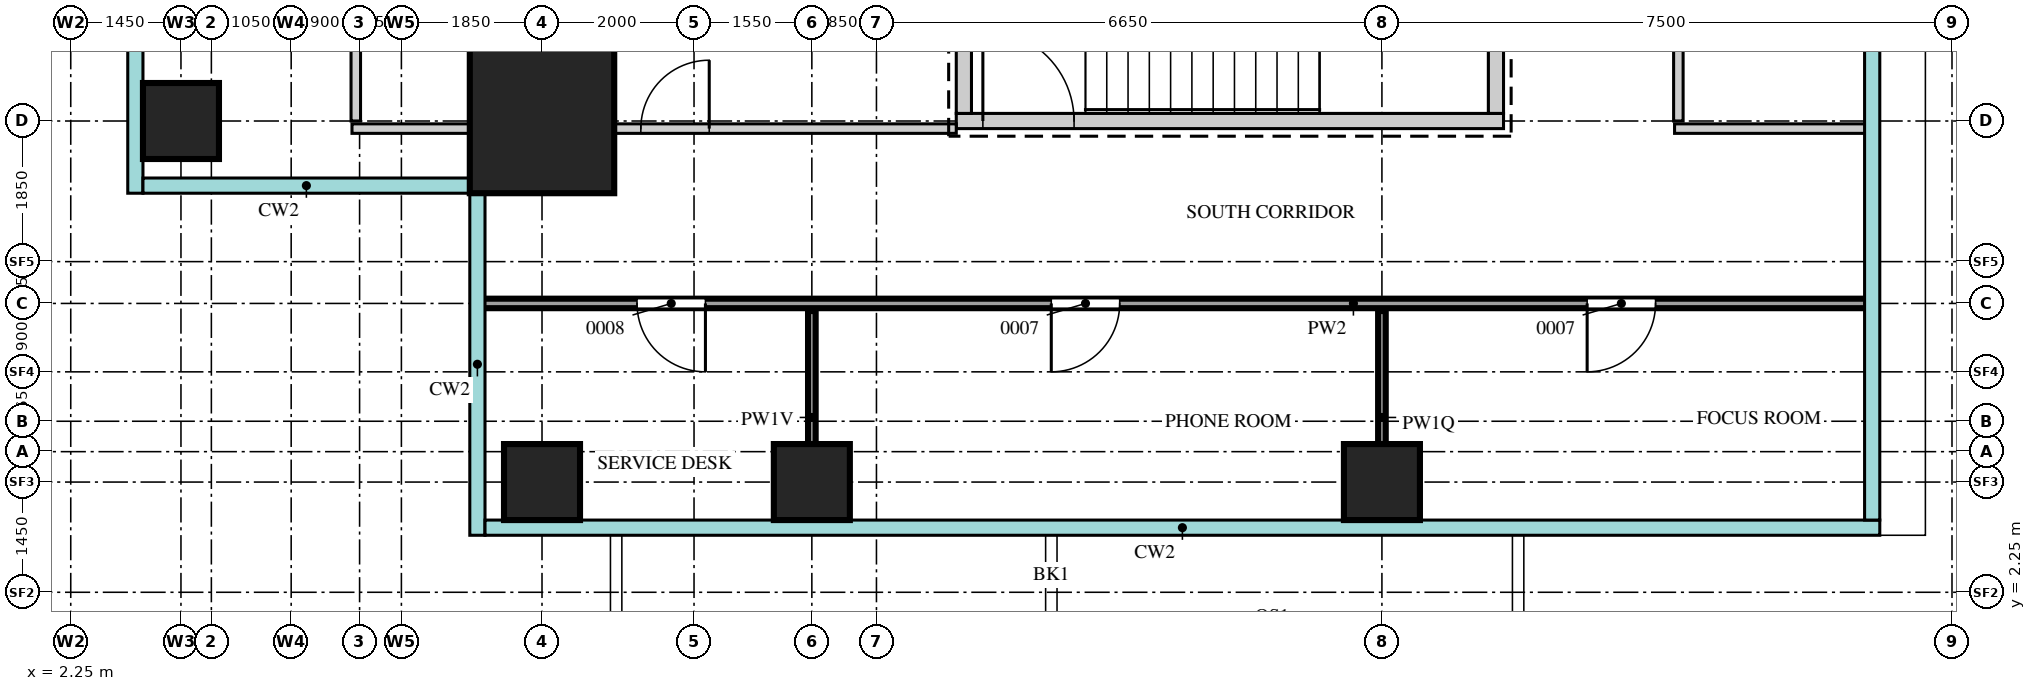
"""IFC4 building model, lengths in metres.
Left out: names, types, materials, properties, quantities, classifications, styles, units other than length and angle.
Written with IfcOpenShell. Run it as: python <this file> out.ifc"""

import sys

from ifc_helpers import new_model, si_unit, direction, frame, frame_2d, origin, origin_2d, place, context, subcontext, project, spatial, rectangle, extrude, source, transform, mapped, element, fill, save


model = new_model("IFC4")
c1 = context("Model", 3, precision=1e-05, world=origin(), true_north=direction((0.0, 1.0)))
c2 = subcontext(c1, "Body", "Model", "MODEL_VIEW")
j1 = project(units=[si_unit("LENGTHUNIT", "METRE"), si_unit("PLANEANGLEUNIT", "RADIAN")], contexts=[c1])
p1 = place(None, origin())
s1 = spatial("IfcSite", under=j1, at=p1, CompositionType="ELEMENT")
p2 = place(p1, origin())
s2 = spatial("IfcBuilding", under=s1, at=p2, CompositionType="ELEMENT")
p3 = place(p2, frame((0.0, 0.0, 168.7)))
s3 = spatial("IfcBuildingStorey", under=s2, at=p3, CompositionType="ELEMENT", Elevation=168.7)
m1 = source(origin(), c2, "Body", "SweptSolid", [
    extrude(rectangle(XDim=7.2, YDim=0.2, at=frame_2d((3.6, 0.0))), origin(), (0.0, 0.0, 1.0), 3.75),
])
p4 = place(p3, frame((13.9, 8.45, 0.0), z_axis=(0.0, 0.0, 1.0), x_axis=(1.0, 0.0, 0.0)))
e1 = element("IfcWall", 1, at=p4, inside=s3, PredefinedType="SHEAR", context=c2, shape_type="MappedRepresentation", body=[
    mapped(m1, transform((0.0, 0.0, 0.0))),
])
m2 = source(origin(), c2, "Body", "SweptSolid", [
    extrude(rectangle(XDim=1.2, YDim=2.1, at=frame_2d((0.6, 1.05))), frame((0.0, 0.11, 0.0), z_axis=(0.0, -1.0, 0.0), x_axis=(1.0, 0.0, 0.0)), (0.0, 0.0, 1.0), 0.22),
])
p5 = place(p4, frame((0.35, 0.0, 0.0)))
e2 = element("IfcOpeningElement", 2, at=p5, cuts=e1, PredefinedType="OPENING", context=c2, shape_type="MappedRepresentation", body=[
    mapped(m2, transform((0.0, 0.0, 0.0))),
])
m3 = source(origin(), c2, "Body", "SweptSolid", [
    extrude(rectangle(XDim=3.35, YDim=0.2, at=frame_2d((1.675, 0.0))), origin(), (0.0, 0.0, 1.0), 3.75),
])
for number, where, z_axis, x_axis in (
    (3, (21.0, 8.55, 0.0), (0.0, 0.0, 1.0), (0.0, 1.0, 0.0)),
    (4, (14.0, 8.55, 0.0), (0.0, 0.0, 1.0), (0.0, 1.0, 0.0)),
):
    element("IfcWall", number, at=place(p3, frame(where, z_axis=z_axis, x_axis=x_axis)), inside=s3, PredefinedType="SHEAR", context=c2, shape_type="MappedRepresentation", body=[
        mapped(m3, transform((0.0, 0.0, 0.0))),
    ])
m4 = source(origin(), c2, "Body", "SweptSolid", [
    extrude(rectangle(XDim=1.9, YDim=1.9, at=origin_2d()), origin(), (0.0, 0.0, 1.0), 4.0),
])
p6 = place(p3, frame((8.45, 8.45, 0.0), z_axis=(0.0, 0.0, 1.0), x_axis=(1.0, 0.0, 0.0)))
e5 = element("IfcColumn", 5, at=p6, inside=s3, PredefinedType="COLUMN", context=c2, shape_type="MappedRepresentation", body=[
    mapped(m4, transform((0.0, 0.0, 0.0))),
])
m5 = source(origin(), c2, "Body", "SweptSolid", [
    extrude(rectangle(XDim=1.0, YDim=1.0, at=origin_2d()), origin(), (0.0, 0.0, 1.0), 3.75),
])
for number, where, z_axis, x_axis in (
    (6, (8.45, 3.7, 0.0), (0.0, 0.0, 1.0), (1.0, 0.0, 0.0)),
    (7, (12.0, 3.7, 0.0), (0.0, 0.0, 1.0), (1.0, 0.0, 0.0)),
    (8, (19.5, 3.7, 0.0), (0.0, 0.0, 1.0), (1.0, 0.0, 0.0)),
    (9, (3.7, 8.45, 0.0), (0.0, 0.0, 1.0), (1.0, 0.0, 0.0)),
):
    element("IfcColumn", number, at=place(p3, frame(where, z_axis=z_axis, x_axis=x_axis)), inside=s3, PredefinedType="COLUMN", context=c2, shape_type="MappedRepresentation", body=[
        mapped(m5, transform((0.0, 0.0, 0.0))),
    ])
m6 = source(origin(), c2, "Body", "SweptSolid", [
    extrude(rectangle(XDim=2.8, YDim=0.1, at=frame_2d((1.4, 0.0))), origin(), (0.0, 0.0, 1.0), 3.25),
])
p7 = place(p3, frame((12.0, 3.15, 0.0), z_axis=(0.0, 0.0, 1.0), x_axis=(0.0, 1.0, 0.0)))
e10 = element("IfcWall", 10, at=p7, inside=s3, PredefinedType="PARTITIONING", context=c2, shape_type="MappedRepresentation", body=[
    mapped(m6, transform((0.0, 0.0, 0.0))),
])
m7 = source(origin(), c2, "Body", "SweptSolid", [
    extrude(rectangle(XDim=2.8, YDim=0.1, at=frame_2d((1.4, 0.0))), origin(), (0.0, 0.0, 1.0), 3.42),
])
p8 = place(p3, frame((19.5, 3.15, 0.0), z_axis=(0.0, 0.0, 1.0), x_axis=(0.0, 1.0, 0.0)))
e11 = element("IfcWall", 11, at=p8, inside=s3, PredefinedType="PARTITIONING", context=c2, shape_type="MappedRepresentation", body=[
    mapped(m7, transform((0.0, 0.0, 0.0))),
])
m8 = source(origin(), c2, "Body", "SweptSolid", [
    extrude(rectangle(XDim=18.25, YDim=0.125, at=frame_2d((9.125, 0.0))), origin(), (0.0, 0.0, 1.0), 3.8),
])
p9 = place(p3, frame((7.65, 6.05, 0.0), z_axis=(0.0, 0.0, 1.0), x_axis=(1.0, 0.0, 0.0)))
e12 = element("IfcWall", 12, at=p9, inside=s3, PredefinedType="PARTITIONING", context=c2, shape_type="MappedRepresentation", body=[
    mapped(m8, transform((0.0, 0.0, 0.0))),
])
m9 = source(origin(), c2, "Body", "SweptSolid", [
    extrude(rectangle(XDim=0.9, YDim=2.1, at=frame_2d((0.45, 1.05))), frame((0.0, 0.073, 0.0), z_axis=(0.0, -1.0, 0.0), x_axis=(1.0, 0.0, 0.0)), (0.0, 0.0, 1.0), 0.145),
])
p10 = place(p9, frame((2.05, 0.0, 0.0)))
e13 = element("IfcOpeningElement", 13, at=p10, cuts=e12, PredefinedType="OPENING", context=c2, shape_type="MappedRepresentation", body=[
    mapped(m9, transform((0.0, 0.0, 0.0))),
])
p11 = place(p9, frame((7.5, 0.0, 0.0)))
e14 = element("IfcOpeningElement", 14, at=p11, cuts=e12, PredefinedType="OPENING", context=c2, shape_type="MappedRepresentation", body=[
    mapped(m9, transform((0.0, 0.0, 0.0))),
])
p12 = place(p9, frame((14.55, 0.0, 0.0)))
e15 = element("IfcOpeningElement", 15, at=p12, cuts=e12, PredefinedType="OPENING", context=c2, shape_type="MappedRepresentation", body=[
    mapped(m9, transform((0.0, 0.0, 0.0))),
])
m10 = source(origin(), c2, "Body", "SweptSolid", [
    extrude(rectangle(XDim=7.95, YDim=0.125, at=frame_2d((3.975, 0.0))), origin(), (0.0, 0.0, 1.0), 3.25),
])
p13 = place(p3, frame((5.95, 8.35, 0.0), z_axis=(0.0, 0.0, 1.0), x_axis=(1.0, 0.0, 0.0)))
e16 = element("IfcWall", 16, at=p13, inside=s3, PredefinedType="PARTITIONING", context=c2, shape_type="MappedRepresentation", body=[
    mapped(m10, transform((0.0, 0.0, 0.0))),
])
p14 = place(p13, frame((3.8, 0.0, 0.0)))
e17 = element("IfcOpeningElement", 17, at=p14, cuts=e16, PredefinedType="OPENING", context=c2, shape_type="MappedRepresentation", body=[
    mapped(m9, transform((0.0, 0.0, 0.0))),
])
m11 = source(origin(), c2, "Body", "SweptSolid", [
    extrude(rectangle(XDim=2.55, YDim=0.125, at=frame_2d((1.275, 0.0))), origin(), (0.0, 0.0, 1.0), 3.8),
])
p15 = place(p3, frame((23.35, 8.35, 0.0), z_axis=(0.0, 0.0, 1.0), x_axis=(1.0, 0.0, 0.0)))
e18 = element("IfcWall", 18, at=p15, inside=s3, PredefinedType="PARTITIONING", context=c2, shape_type="MappedRepresentation", body=[
    mapped(m11, transform((0.0, 0.0, 0.0))),
])
m12 = source(origin(), c2, "Body", "SweptSolid", [
    extrude(rectangle(XDim=4.05, YDim=0.125, at=frame_2d((2.025, 0.0))), origin(), (0.0, 0.0, 1.0), 3.8),
])
p16 = place(p3, frame((6.0, 8.45, 0.0), z_axis=(0.0, 0.0, 1.0), x_axis=(0.0, 1.0, 0.0)))
e19 = element("IfcWall", 19, at=p16, inside=s3, PredefinedType="PARTITIONING", context=c2, shape_type="MappedRepresentation", body=[
    mapped(m12, transform((0.0, 0.0, 0.0))),
])
m13 = source(origin(), c2, "Body", "SweptSolid", [
    extrude(rectangle(XDim=12.45, YDim=0.125, at=frame_2d((6.225, 0.0))), origin(), (0.0, 0.0, 1.0), 3.8),
])
p17 = place(p3, frame((23.4, 8.45, 0.0), z_axis=(0.0, 0.0, 1.0), x_axis=(0.0, 1.0, 0.0)))
e20 = element("IfcWall", 20, at=p17, inside=s3, PredefinedType="PARTITIONING", context=c2, shape_type="MappedRepresentation", body=[
    mapped(m13, transform((0.0, 0.0, 0.0))),
])
p18 = place(p17, frame((5.65, 0.0, 0.0)))
e21 = element("IfcOpeningElement", 21, at=p18, cuts=e20, PredefinedType="OPENING", context=c2, shape_type="MappedRepresentation", body=[
    mapped(m9, transform((0.0, 0.0, 0.0))),
])
m14 = source(origin(), c2, "Body", "SweptSolid", [
    extrude(rectangle(XDim=0.9, YDim=2.1, at=frame_2d((0.45, 1.05))), frame((0.0, 0.025, 0.0), z_axis=(0.0, -1.0, 0.0), x_axis=(1.0, 0.0, 0.0)), (0.0, 0.0, 1.0), 0.05),
])
p19 = place(p14, origin())
e22 = element("IfcDoor", 22, at=p19, inside=s3, OperationType="SINGLE_SWING_LEFT", PredefinedType="DOOR", context=c2, shape_type="MappedRepresentation", body=[
    mapped(m14, transform((0.0, 0.0, 0.0))),
])
fill(e17, e22)
p20 = place(p10, origin())
e23 = element("IfcDoor", 23, at=p20, inside=s3, OperationType="SINGLE_SWING_RIGHT", PredefinedType="DOOR", context=c2, shape_type="MappedRepresentation", body=[
    mapped(m14, transform((0.0, 0.0, 0.0))),
])
fill(e13, e23)
p21 = place(p11, origin())
e24 = element("IfcDoor", 24, at=p21, inside=s3, OperationType="SINGLE_SWING_LEFT", PredefinedType="DOOR", context=c2, shape_type="MappedRepresentation", body=[
    mapped(m14, transform((0.0, 0.0, 0.0))),
])
fill(e14, e24)
p22 = place(p12, origin())
e25 = element("IfcDoor", 25, at=p22, inside=s3, OperationType="SINGLE_SWING_LEFT", PredefinedType="DOOR", context=c2, shape_type="MappedRepresentation", body=[
    mapped(m14, transform((0.0, 0.0, 0.0))),
])
fill(e15, e25)
m15 = source(origin(), c2, "Body", "SweptSolid", [
    extrude(rectangle(XDim=1.2, YDim=2.1, at=frame_2d((0.6, 1.05))), frame((0.0, 0.025, 0.0), z_axis=(0.0, -1.0, 0.0), x_axis=(1.0, 0.0, 0.0)), (0.0, 0.0, 1.0), 0.05),
])
p23 = place(p5, origin())
e26 = element("IfcDoor", 26, at=p23, inside=s3, OperationType="SINGLE_SWING_RIGHT", PredefinedType="DOOR", context=c2, shape_type="MappedRepresentation", body=[
    mapped(m15, transform((0.0, 0.0, 0.0))),
])
fill(e2, e26)
save(model, sys.argv[1])
